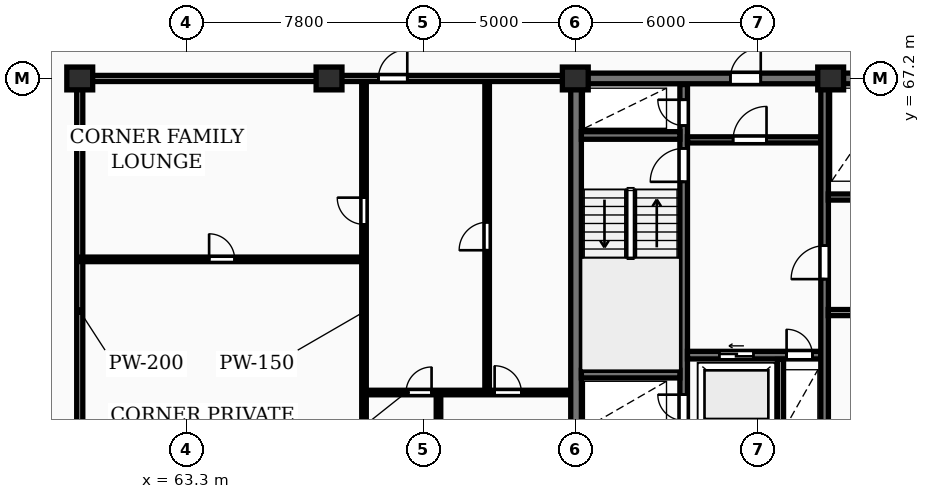
"""IFC4 building model, lengths in metres.
Left out: names, types, materials, properties, quantities, classifications, styles, units other than length and angle.
Written with IfcOpenShell. Run it as: python <this file> out.ifc"""

import sys

from ifc_helpers import new_model, si_unit, direction, frame, frame_2d, origin, origin_2d, place, context, subcontext, project, spatial, rectangle, extrude, element, fill, save


model = new_model("IFC4")
c1 = context("Model", 3, precision=1e-05, world=origin(), true_north=direction((0.0, 1.0)))
c2 = subcontext(c1, "Body", "Model", "MODEL_VIEW")
j1 = project(units=[si_unit("LENGTHUNIT", "METRE"), si_unit("PLANEANGLEUNIT", "RADIAN")], contexts=[c1])
p1 = place(None, origin())
s1 = spatial("IfcSite", under=j1, at=p1, CompositionType="ELEMENT")
p2 = place(p1, origin())
s2 = spatial("IfcBuilding", under=s1, at=p2, CompositionType="ELEMENT")
p3 = place(p2, frame((0.0, 0.0, 204.35)))
s3 = spatial("IfcBuildingStorey", under=s2, at=p3, CompositionType="ELEMENT", Elevation=204.35)
for number, where, z_axis, x_axis in (
    (1, (59.8, 67.2, 0.0), (0.0, 0.0, 1.0), (1.0, 0.0, 0.0)),
    (2, (68.0, 67.2, 0.0), (0.0, 0.0, 1.0), (1.0, 0.0, 0.0)),
    (3, (76.1, 67.2, 0.0), (0.0, 0.0, 1.0), (1.0, 0.0, 0.0)),
    (4, (84.5, 67.2, 0.0), (0.0, 0.0, 1.0), (1.0, 0.0, 0.0)),
):
    element("IfcColumn", number, at=place(p3, frame(where, z_axis=z_axis, x_axis=x_axis)), inside=s3, PredefinedType="COLUMN", context=c2, shape_type="SweptSolid", body=[
        extrude(rectangle(XDim=0.85, YDim=0.75, at=origin_2d()), origin(), (0.0, 0.0, 1.0), 3.25),
    ])
p4 = place(p3, frame((76.125, 55.375, 0.0), z_axis=(0.0, 0.0, 1.0), x_axis=(0.0, 1.0, 0.0)))
e5 = element("IfcWall", 5, at=p4, inside=s3, PredefinedType="SHEAR", context=c2, shape_type="SweptSolid", body=[
    extrude(rectangle(XDim=11.65, YDim=0.35, at=frame_2d((5.825, 0.0))), origin(), (0.0, 0.0, 1.0), 3.25),
])
p5 = place(p3, frame((75.95, 67.2, 0.0), z_axis=(0.0, 0.0, 1.0), x_axis=(1.0, 0.0, 0.0)))
e6 = element("IfcWall", 6, at=p5, inside=s3, PredefinedType="SHEAR", context=c2, shape_type="SweptSolid", body=[
    extrude(rectangle(XDim=36.3, YDim=0.35, at=frame_2d((18.15, 0.0))), origin(), (0.0, 0.0, 1.0), 3.25),
])
p6 = place(p5, frame((5.25, 0.0, 0.0)))
e7 = element("IfcOpeningElement", 7, at=p6, cuts=e6, PredefinedType="OPENING", context=c2, shape_type="SweptSolid", body=[
    extrude(rectangle(XDim=1.0, YDim=2.15, at=frame_2d((0.5, 1.075))), frame((0.0, 0.185, 0.0), z_axis=(0.0, -1.0, 0.0), x_axis=(1.0, 0.0, 0.0)), (0.0, 0.0, 1.0), 0.37),
])
p7 = place(p5, frame((21.6, 0.0, 0.0)))
e8 = element("IfcOpeningElement", 8, at=p7, cuts=e6, PredefinedType="OPENING", context=c2, shape_type="SweptSolid", body=[
    extrude(rectangle(XDim=1.5, YDim=2.2, at=frame_2d((0.75, 1.1))), frame((0.0, 0.185, 0.0), z_axis=(0.0, -1.0, 0.0), x_axis=(1.0, 0.0, 0.0)), (0.0, 0.0, 1.0), 0.37),
])
p8 = place(p5, frame((30.45, 0.0, 0.0)))
e9 = element("IfcOpeningElement", 9, at=p8, cuts=e6, PredefinedType="OPENING", context=c2, shape_type="SweptSolid", body=[
    extrude(rectangle(XDim=1.0, YDim=2.15, at=frame_2d((0.5, 1.075))), frame((0.0, 0.185, 0.0), z_axis=(0.0, -1.0, 0.0), x_axis=(1.0, 0.0, 0.0)), (0.0, 0.0, 1.0), 0.37),
])
p9 = place(p3, frame((79.665, 55.4, 0.0), z_axis=(0.0, 0.0, 1.0), x_axis=(0.0, 1.0, 0.0)))
e10 = element("IfcWall", 10, at=p9, inside=s3, PredefinedType="SHEAR", context=c2, shape_type="SweptSolid", body=[
    extrude(rectangle(XDim=11.6, YDim=0.25, at=frame_2d((5.8, 0.0))), origin(), (0.0, 0.0, 1.0), 3.25),
])
p10 = place(p9, frame((0.55, 0.0, 0.0)))
e11 = element("IfcOpeningElement", 11, at=p10, cuts=e10, PredefinedType="OPENING", context=c2, shape_type="SweptSolid", body=[
    extrude(rectangle(XDim=0.85, YDim=2.05, at=frame_2d((0.425, 1.025))), frame((0.0, 0.135, 0.0), z_axis=(0.0, -1.0, 0.0), x_axis=(1.0, 0.0, 0.0)), (0.0, 0.0, 1.0), 0.27),
])
p11 = place(p9, frame((8.4, 0.0, 0.0)))
e12 = element("IfcOpeningElement", 12, at=p11, cuts=e10, PredefinedType="OPENING", context=c2, shape_type="SweptSolid", body=[
    extrude(rectangle(XDim=1.1, YDim=2.1, at=frame_2d((0.55, 1.05))), frame((0.0, 0.135, 0.0), z_axis=(0.0, -1.0, 0.0), x_axis=(1.0, 0.0, 0.0)), (0.0, 0.0, 1.0), 0.27),
])
p12 = place(p9, frame((10.25, 0.0, 0.0)))
e13 = element("IfcOpeningElement", 13, at=p12, cuts=e10, PredefinedType="OPENING", context=c2, shape_type="SweptSolid", body=[
    extrude(rectangle(XDim=0.85, YDim=2.05, at=frame_2d((0.425, 1.025))), frame((0.0, 0.135, 0.0), z_axis=(0.0, -1.0, 0.0), x_axis=(1.0, 0.0, 0.0)), (0.0, 0.0, 1.0), 0.27),
])
for number, where, z_axis, x_axis in (
    (14, (76.3, 57.475, 0.0), (0.0, 0.0, 1.0), (1.0, 0.0, 0.0)),
    (15, (76.3, 65.325, 0.0), (0.0, 0.0, 1.0), (1.0, 0.0, 0.0)),
):
    element("IfcWall", number, at=place(p3, frame(where, z_axis=z_axis, x_axis=x_axis)), inside=s3, PredefinedType="SHEAR", context=c2, shape_type="SweptSolid", body=[
        extrude(rectangle(XDim=3.24, YDim=0.25, at=frame_2d((1.62, 0.0))), origin(), (0.0, 0.0, 1.0), 3.25),
    ])
p13 = place(p3, frame((79.79, 58.1, 0.0), z_axis=(0.0, 0.0, 1.0), x_axis=(1.0, 0.0, 0.0)))
e16 = element("IfcWall", 16, at=p13, inside=s3, PredefinedType="SHEAR", context=c2, shape_type="SweptSolid", body=[
    extrude(rectangle(XDim=4.39, YDim=0.25, at=frame_2d((2.195, 0.0))), origin(), (0.0, 0.0, 1.0), 3.25),
])
p14 = place(p13, frame((1.05, 0.0, 0.0)))
e17 = element("IfcOpeningElement", 17, at=p14, cuts=e16, PredefinedType="OPENING", context=c2, shape_type="SweptSolid", body=[
    extrude(rectangle(XDim=1.12, YDim=2.12, at=frame_2d((0.56, 1.06))), frame((0.0, 0.135, 0.0), z_axis=(0.0, -1.0, 0.0), x_axis=(1.0, 0.0, 0.0)), (0.0, 0.0, 1.0), 0.27),
])
p15 = place(p13, frame((3.26, 0.0, 0.0)))
e18 = element("IfcOpeningElement", 18, at=p15, cuts=e16, PredefinedType="OPENING", context=c2, shape_type="SweptSolid", body=[
    extrude(rectangle(XDim=0.85, YDim=2.05, at=frame_2d((0.425, 1.025))), frame((0.0, 0.135, 0.0), z_axis=(0.0, -1.0, 0.0), x_axis=(1.0, 0.0, 0.0)), (0.0, 0.0, 1.0), 0.27),
])
p16 = place(p3, frame((82.85, 55.4, 0.0), z_axis=(0.0, 0.0, 1.0), x_axis=(0.0, 1.0, 0.0)))
e19 = element("IfcWall", 19, at=p16, inside=s3, PredefinedType="PARTITIONING", context=c2, shape_type="SweptSolid", body=[
    extrude(rectangle(XDim=2.56, YDim=0.2, at=frame_2d((1.28, 0.0))), origin(), (0.0, 0.0, 1.0), 2.98),
])
p17 = place(p3, frame((79.79, 65.18, 0.0), z_axis=(0.0, 0.0, 1.0), x_axis=(1.0, 0.0, 0.0)))
e20 = element("IfcWall", 20, at=p17, inside=s3, PredefinedType="PARTITIONING", context=c2, shape_type="SweptSolid", body=[
    extrude(rectangle(XDim=4.39, YDim=0.2, at=frame_2d((2.195, 0.0))), origin(), (0.0, 0.0, 1.0), 2.98),
])
p18 = place(p17, frame((1.5, 0.0, 0.0)))
e21 = element("IfcOpeningElement", 21, at=p18, cuts=e20, PredefinedType="OPENING", context=c2, shape_type="SweptSolid", body=[
    extrude(rectangle(XDim=1.1, YDim=2.1, at=frame_2d((0.55, 1.05))), frame((0.0, 0.11, 0.0), z_axis=(0.0, -1.0, 0.0), x_axis=(1.0, 0.0, 0.0)), (0.0, 0.0, 1.0), 0.22),
])
p19 = place(p3, frame((84.3, 55.4, 0.0), z_axis=(0.0, 0.0, 1.0), x_axis=(0.0, 1.0, 0.0)))
e22 = element("IfcWall", 22, at=p19, inside=s3, PredefinedType="SHEAR", context=c2, shape_type="SweptSolid", body=[
    extrude(rectangle(XDim=11.6, YDim=0.25, at=frame_2d((5.8, 0.0))), origin(), (0.0, 0.0, 1.0), 3.25),
])
p20 = place(p19, frame((5.2, 0.0, 0.0)))
e23 = element("IfcOpeningElement", 23, at=p20, cuts=e22, PredefinedType="OPENING", context=c2, shape_type="SweptSolid", body=[
    extrude(rectangle(XDim=1.1, YDim=2.1, at=frame_2d((0.55, 1.05))), frame((0.0, 0.135, 0.0), z_axis=(0.0, -1.0, 0.0), x_axis=(1.0, 0.0, 0.0)), (0.0, 0.0, 1.0), 0.27),
])
p21 = place(p3, frame((84.42, 59.5, 0.0), z_axis=(0.0, 0.0, 1.0), x_axis=(1.0, 0.0, 0.0)))
e24 = element("IfcWall", 24, at=p21, inside=s3, PredefinedType="PARTITIONING", context=c2, shape_type="SweptSolid", body=[
    extrude(rectangle(XDim=8.36, YDim=0.2, at=frame_2d((4.18, 0.0))), origin(), (0.0, 0.0, 1.0), 2.98),
])
p22 = place(p21, frame((3.4, 0.0, 0.0)))
e25 = element("IfcOpeningElement", 25, at=p22, cuts=e24, PredefinedType="OPENING", context=c2, shape_type="SweptSolid", body=[
    extrude(rectangle(XDim=0.92, YDim=2.08, at=frame_2d((0.46, 1.04))), frame((0.0, 0.11, 0.0), z_axis=(0.0, -1.0, 0.0), x_axis=(1.0, 0.0, 0.0)), (0.0, 0.0, 1.0), 0.22),
])
p23 = place(p3, frame((84.42, 63.3, 0.0), z_axis=(0.0, 0.0, 1.0), x_axis=(1.0, 0.0, 0.0)))
e26 = element("IfcWall", 26, at=p23, inside=s3, PredefinedType="PARTITIONING", context=c2, shape_type="SweptSolid", body=[
    extrude(rectangle(XDim=19.83, YDim=0.2, at=frame_2d((9.915, 0.0))), origin(), (0.0, 0.0, 1.0), 2.98),
])
p24 = place(p23, frame((1.15, 0.0, 0.0)))
e27 = element("IfcOpeningElement", 27, at=p24, cuts=e26, PredefinedType="OPENING", context=c2, shape_type="SweptSolid", body=[
    extrude(rectangle(XDim=0.85, YDim=2.05, at=frame_2d((0.425, 1.025))), frame((0.0, 0.11, 0.0), z_axis=(0.0, -1.0, 0.0), x_axis=(1.0, 0.0, 0.0)), (0.0, 0.0, 1.0), 0.22),
])
p25 = place(p23, frame((3.25, 0.0, 0.0)))
e28 = element("IfcOpeningElement", 28, at=p25, cuts=e26, PredefinedType="OPENING", context=c2, shape_type="SweptSolid", body=[
    extrude(rectangle(XDim=0.85, YDim=2.05, at=frame_2d((0.425, 1.025))), frame((0.0, 0.11, 0.0), z_axis=(0.0, -1.0, 0.0), x_axis=(1.0, 0.0, 0.0)), (0.0, 0.0, 1.0), 0.22),
])
p26 = place(p23, frame((13.08, 0.0, 0.0)))
e29 = element("IfcOpeningElement", 29, at=p26, cuts=e26, PredefinedType="OPENING", context=c2, shape_type="SweptSolid", body=[
    extrude(rectangle(XDim=1.5, YDim=2.2, at=frame_2d((0.75, 1.1))), frame((0.0, 0.11, 0.0), z_axis=(0.0, -1.0, 0.0), x_axis=(1.0, 0.0, 0.0)), (0.0, 0.0, 1.0), 0.22),
])
p27 = place(p23, frame((6.68, 0.0, 0.0)))
e30 = element("IfcOpeningElement", 30, at=p27, cuts=e26, PredefinedType="OPENING", context=c2, shape_type="SweptSolid", body=[
    extrude(rectangle(XDim=0.92, YDim=2.08, at=frame_2d((0.46, 1.04))), frame((0.0, 0.11, 0.0), z_axis=(0.0, -1.0, 0.0), x_axis=(1.0, 0.0, 0.0)), (0.0, 0.0, 1.0), 0.22),
])
p28 = place(p23, frame((16.33, 0.0, 0.0)))
e31 = element("IfcOpeningElement", 31, at=p28, cuts=e26, PredefinedType="OPENING", context=c2, shape_type="SweptSolid", body=[
    extrude(rectangle(XDim=0.88, YDim=2.06, at=frame_2d((0.44, 1.03))), frame((0.0, 0.11, 0.0), z_axis=(0.0, -1.0, 0.0), x_axis=(1.0, 0.0, 0.0)), (0.0, 0.0, 1.0), 0.22),
])
p29 = place(p3, frame((59.8, 51.9, 0.0), z_axis=(0.0, 0.0, 1.0), x_axis=(0.0, 1.0, 0.0)))
e32 = element("IfcWall", 32, at=p29, inside=s3, PredefinedType="PARTITIONING", context=c2, shape_type="SweptSolid", body=[
    extrude(rectangle(XDim=15.3, YDim=0.2, at=frame_2d((7.65, 0.0))), origin(), (0.0, 0.0, 1.0), 2.287),
])
p30 = place(p3, frame((59.8, 61.25, 0.0), z_axis=(0.0, 0.0, 1.0), x_axis=(1.0, 0.0, 0.0)))
e33 = element("IfcWall", 33, at=p30, inside=s3, PredefinedType="PARTITIONING", context=c2, shape_type="SweptSolid", body=[
    extrude(rectangle(XDim=9.35, YDim=0.15, at=frame_2d((4.675, 0.0))), origin(), (0.0, 0.0, 1.0), 2.98),
])
p31 = place(p30, frame((4.255, 0.0, 0.0)))
e34 = element("IfcOpeningElement", 34, at=p31, cuts=e33, PredefinedType="OPENING", context=c2, shape_type="SweptSolid", body=[
    extrude(rectangle(XDim=0.84, YDim=2.04, at=frame_2d((0.42, 1.02))), frame((0.0, 0.085, 0.0), z_axis=(0.0, -1.0, 0.0), x_axis=(1.0, 0.0, 0.0)), (0.0, 0.0, 1.0), 0.17),
])
p32 = place(p3, frame((69.15, 51.9, 0.0), z_axis=(0.0, 0.0, 1.0), x_axis=(0.0, 1.0, 0.0)))
e35 = element("IfcWall", 35, at=p32, inside=s3, PredefinedType="PARTITIONING", context=c2, shape_type="SweptSolid", body=[
    extrude(rectangle(XDim=15.25, YDim=0.15, at=frame_2d((7.625, 0.0))), origin(), (0.0, 0.0, 1.0), 2.98),
])
p33 = place(p32, frame((10.5, 0.0, 0.0)))
e36 = element("IfcOpeningElement", 36, at=p33, cuts=e35, PredefinedType="OPENING", context=c2, shape_type="SweptSolid", body=[
    extrude(rectangle(XDim=0.88, YDim=2.06, at=frame_2d((0.44, 1.03))), frame((0.0, 0.085, 0.0), z_axis=(0.0, -1.0, 0.0), x_axis=(1.0, 0.0, 0.0)), (0.0, 0.0, 1.0), 0.17),
])
p34 = place(p3, frame((73.2, 56.87, 0.0), z_axis=(0.0, 0.0, 1.0), x_axis=(0.0, 1.0, 0.0)))
e37 = element("IfcWall", 37, at=p34, inside=s3, PredefinedType="PARTITIONING", context=c2, shape_type="SweptSolid", body=[
    extrude(rectangle(XDim=10.28, YDim=0.15, at=frame_2d((5.14, 0.0))), origin(), (0.0, 0.0, 1.0), 2.98),
])
p35 = place(p34, frame((4.68, 0.0, 0.0)))
e38 = element("IfcOpeningElement", 38, at=p35, cuts=e37, PredefinedType="OPENING", context=c2, shape_type="SweptSolid", body=[
    extrude(rectangle(XDim=0.92, YDim=2.08, at=frame_2d((0.46, 1.04))), frame((0.0, 0.085, 0.0), z_axis=(0.0, -1.0, 0.0), x_axis=(1.0, 0.0, 0.0)), (0.0, 0.0, 1.0), 0.17),
])
p36 = place(p3, frame((71.6, 51.9, 0.0), z_axis=(0.0, 0.0, 1.0), x_axis=(0.0, 1.0, 0.0)))
e39 = element("IfcWall", 39, at=p36, inside=s3, PredefinedType="PARTITIONING", context=c2, shape_type="SweptSolid", body=[
    extrude(rectangle(XDim=4.97, YDim=0.15, at=frame_2d((2.485, 0.0))), origin(), (0.0, 0.0, 1.0), 2.98),
])
p37 = place(p3, frame((69.17, 56.87, 0.0), z_axis=(0.0, 0.0, 1.0), x_axis=(1.0, 0.0, 0.0)))
e40 = element("IfcWall", 40, at=p37, inside=s3, PredefinedType="PARTITIONING", context=c2, shape_type="SweptSolid", body=[
    extrude(rectangle(XDim=6.76, YDim=0.15, at=frame_2d((3.38, 0.0))), origin(), (0.0, 0.0, 1.0), 2.98),
])
p38 = place(p37, frame((1.362, 0.0, 0.0)))
e41 = element("IfcOpeningElement", 41, at=p38, cuts=e40, PredefinedType="OPENING", context=c2, shape_type="SweptSolid", body=[
    extrude(rectangle(XDim=0.84, YDim=2.04, at=frame_2d((0.42, 1.02))), frame((0.0, 0.085, 0.0), z_axis=(0.0, -1.0, 0.0), x_axis=(1.0, 0.0, 0.0)), (0.0, 0.0, 1.0), 0.17),
])
p39 = place(p37, frame((4.277, 0.0, 0.0)))
e42 = element("IfcOpeningElement", 42, at=p39, cuts=e40, PredefinedType="OPENING", context=c2, shape_type="SweptSolid", body=[
    extrude(rectangle(XDim=0.88, YDim=2.06, at=frame_2d((0.44, 1.03))), frame((0.0, 0.085, 0.0), z_axis=(0.0, -1.0, 0.0), x_axis=(1.0, 0.0, 0.0)), (0.0, 0.0, 1.0), 0.17),
])
p40 = place(p3, frame((59.8, 67.2, 0.0), z_axis=(0.0, 0.0, 1.0), x_axis=(1.0, 0.0, 0.0)))
e43 = element("IfcWall", 43, at=p40, inside=s3, PredefinedType="PARTITIONING", context=c2, shape_type="SweptSolid", body=[
    extrude(rectangle(XDim=16.15, YDim=0.2, at=frame_2d((8.075, 0.0))), origin(), (0.0, 0.0, 1.0), 2.443),
])
p41 = place(p40, frame((9.823, 0.0, 0.0)))
e44 = element("IfcOpeningElement", 44, at=p41, cuts=e43, PredefinedType="OPENING", context=c2, shape_type="SweptSolid", body=[
    extrude(rectangle(XDim=0.95, YDim=2.15, at=frame_2d((0.475, 1.075))), frame((0.0, 0.11, 0.0), z_axis=(0.0, -1.0, 0.0), x_axis=(1.0, 0.0, 0.0)), (0.0, 0.0, 1.0), 0.22),
])
p42 = place(p6, origin())
e45 = element("IfcDoor", 45, at=p42, inside=s3, OperationType="SINGLE_SWING_RIGHT", PredefinedType="DOOR", context=c2, shape_type="SweptSolid", body=[
    extrude(rectangle(XDim=1.0, YDim=2.15, at=frame_2d((0.5, 1.075))), frame((0.0, 0.025, 0.0), z_axis=(0.0, -1.0, 0.0), x_axis=(1.0, 0.0, 0.0)), (0.0, 0.0, 1.0), 0.05),
])
fill(e7, e45)
p43 = place(p10, origin())
e46 = element("IfcDoor", 46, at=p43, inside=s3, OperationType="SINGLE_SWING_RIGHT", PredefinedType="DOOR", context=c2, shape_type="SweptSolid", body=[
    extrude(rectangle(XDim=0.85, YDim=2.05, at=frame_2d((0.425, 1.025))), frame((0.0, 0.025, 0.0), z_axis=(0.0, -1.0, 0.0), x_axis=(1.0, 0.0, 0.0)), (0.0, 0.0, 1.0), 0.05),
])
fill(e11, e46)
p44 = place(p11, origin())
e47 = element("IfcDoor", 47, at=p44, inside=s3, OperationType="SINGLE_SWING_LEFT", PredefinedType="DOOR", context=c2, shape_type="SweptSolid", body=[
    extrude(rectangle(XDim=1.1, YDim=2.1, at=frame_2d((0.55, 1.05))), frame((0.0, 0.025, 0.0), z_axis=(0.0, -1.0, 0.0), x_axis=(1.0, 0.0, 0.0)), (0.0, 0.0, 1.0), 0.05),
])
fill(e12, e47)
p45 = place(p12, origin())
e48 = element("IfcDoor", 48, at=p45, inside=s3, OperationType="SINGLE_SWING_RIGHT", PredefinedType="DOOR", context=c2, shape_type="SweptSolid", body=[
    extrude(rectangle(XDim=0.85, YDim=2.05, at=frame_2d((0.425, 1.025))), frame((0.0, 0.025, 0.0), z_axis=(0.0, -1.0, 0.0), x_axis=(1.0, 0.0, 0.0)), (0.0, 0.0, 1.0), 0.05),
])
fill(e13, e48)
p46 = place(p14, origin())
e49 = element("IfcDoor", 49, at=p46, inside=s3, OperationType="SLIDING_TO_LEFT", PredefinedType="DOOR", context=c2, shape_type="SweptSolid", body=[
    extrude(rectangle(XDim=1.12, YDim=2.12, at=frame_2d((0.56, 1.06))), frame((0.0, 0.025, 0.0), z_axis=(0.0, -1.0, 0.0), x_axis=(1.0, 0.0, 0.0)), (0.0, 0.0, 1.0), 0.05),
])
fill(e17, e49)
p47 = place(p15, origin())
e50 = element("IfcDoor", 50, at=p47, inside=s3, OperationType="SINGLE_SWING_LEFT", PredefinedType="DOOR", context=c2, shape_type="SweptSolid", body=[
    extrude(rectangle(XDim=0.85, YDim=2.05, at=frame_2d((0.425, 1.025))), frame((0.0, 0.025, 0.0), z_axis=(0.0, -1.0, 0.0), x_axis=(1.0, 0.0, 0.0)), (0.0, 0.0, 1.0), 0.05),
])
fill(e18, e50)
p48 = place(p18, origin())
e51 = element("IfcDoor", 51, at=p48, inside=s3, OperationType="SINGLE_SWING_RIGHT", PredefinedType="DOOR", context=c2, shape_type="SweptSolid", body=[
    extrude(rectangle(XDim=1.1, YDim=2.1, at=frame_2d((0.55, 1.05))), frame((0.0, 0.025, 0.0), z_axis=(0.0, -1.0, 0.0), x_axis=(1.0, 0.0, 0.0)), (0.0, 0.0, 1.0), 0.05),
])
fill(e21, e51)
p49 = place(p20, origin())
e52 = element("IfcDoor", 52, at=p49, inside=s3, OperationType="SINGLE_SWING_LEFT", PredefinedType="DOOR", context=c2, shape_type="SweptSolid", body=[
    extrude(rectangle(XDim=1.1, YDim=2.1, at=frame_2d((0.55, 1.05))), frame((0.0, 0.025, 0.0), z_axis=(0.0, -1.0, 0.0), x_axis=(1.0, 0.0, 0.0)), (0.0, 0.0, 1.0), 0.05),
])
fill(e23, e52)
p50 = place(p31, origin())
e53 = element("IfcDoor", 53, at=p50, inside=s3, OperationType="SINGLE_SWING_LEFT", PredefinedType="DOOR", context=c2, shape_type="SweptSolid", body=[
    extrude(rectangle(XDim=0.84, YDim=2.04, at=frame_2d((0.42, 1.02))), frame((0.0, 0.025, 0.0), z_axis=(0.0, -1.0, 0.0), x_axis=(1.0, 0.0, 0.0)), (0.0, 0.0, 1.0), 0.05),
])
fill(e34, e53)
p51 = place(p33, origin())
e54 = element("IfcDoor", 54, at=p51, inside=s3, OperationType="SINGLE_SWING_RIGHT", PredefinedType="DOOR", context=c2, shape_type="SweptSolid", body=[
    extrude(rectangle(XDim=0.88, YDim=2.06, at=frame_2d((0.44, 1.03))), frame((0.0, 0.025, 0.0), z_axis=(0.0, -1.0, 0.0), x_axis=(1.0, 0.0, 0.0)), (0.0, 0.0, 1.0), 0.05),
])
fill(e36, e54)
p52 = place(p35, origin())
e55 = element("IfcDoor", 55, at=p52, inside=s3, OperationType="SINGLE_SWING_LEFT", PredefinedType="DOOR", context=c2, shape_type="SweptSolid", body=[
    extrude(rectangle(XDim=0.92, YDim=2.08, at=frame_2d((0.46, 1.04))), frame((0.0, 0.025, 0.0), z_axis=(0.0, -1.0, 0.0), x_axis=(1.0, 0.0, 0.0)), (0.0, 0.0, 1.0), 0.05),
])
fill(e38, e55)
p53 = place(p38, origin())
e56 = element("IfcDoor", 56, at=p53, inside=s3, OperationType="SINGLE_SWING_RIGHT", PredefinedType="DOOR", context=c2, shape_type="SweptSolid", body=[
    extrude(rectangle(XDim=0.84, YDim=2.04, at=frame_2d((0.42, 1.02))), frame((0.0, 0.025, 0.0), z_axis=(0.0, -1.0, 0.0), x_axis=(1.0, 0.0, 0.0)), (0.0, 0.0, 1.0), 0.05),
])
fill(e41, e56)
p54 = place(p39, origin())
e57 = element("IfcDoor", 57, at=p54, inside=s3, OperationType="SINGLE_SWING_LEFT", PredefinedType="DOOR", context=c2, shape_type="SweptSolid", body=[
    extrude(rectangle(XDim=0.88, YDim=2.06, at=frame_2d((0.44, 1.03))), frame((0.0, 0.025, 0.0), z_axis=(0.0, -1.0, 0.0), x_axis=(1.0, 0.0, 0.0)), (0.0, 0.0, 1.0), 0.05),
])
fill(e42, e57)
p55 = place(p41, origin())
e58 = element("IfcDoor", 58, at=p55, inside=s3, OperationType="SINGLE_SWING_RIGHT", PredefinedType="DOOR", context=c2, shape_type="SweptSolid", body=[
    extrude(rectangle(XDim=0.95, YDim=2.15, at=frame_2d((0.475, 1.075))), frame((0.0, 0.025, 0.0), z_axis=(0.0, -1.0, 0.0), x_axis=(1.0, 0.0, 0.0)), (0.0, 0.0, 1.0), 0.05),
])
fill(e44, e58)
save(model, sys.argv[1])
